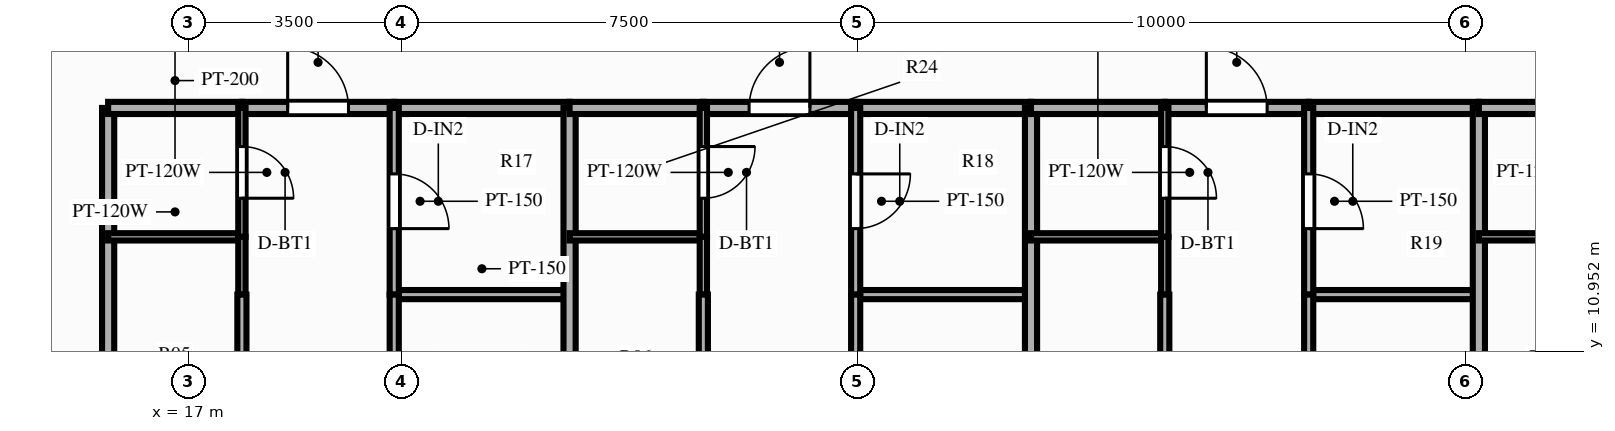
"""IFC4 building model, lengths in metres.
Left out: names, types, materials, properties, quantities, classifications, styles, units other than length and angle.
Written with IfcOpenShell. Run it as: python <this file> out.ifc"""

import sys

from ifc_helpers import new_model, si_unit, direction, frame, frame_2d, origin, place, context, subcontext, project, spatial, rectangle, extrude, source, transform, mapped, element, fill, save


model = new_model("IFC4")
c1 = context("Model", 3, precision=1e-05, world=origin(), true_north=direction((0.0, 1.0)))
c2 = subcontext(c1, "Body", "Model", "MODEL_VIEW")
j1 = project(units=[si_unit("LENGTHUNIT", "METRE"), si_unit("PLANEANGLEUNIT", "RADIAN")], contexts=[c1])
p1 = place(None, origin())
s1 = spatial("IfcSite", under=j1, at=p1, CompositionType="ELEMENT")
p2 = place(p1, origin())
s2 = spatial("IfcBuilding", under=s1, at=p2, CompositionType="ELEMENT")
p3 = place(p2, frame((0.0, 0.0, 25.4)))
s3 = spatial("IfcBuildingStorey", under=s2, at=p3, CompositionType="ELEMENT", Elevation=25.4)
p4 = place(p3, frame((15.68, 14.95, 0.0), z_axis=(0.0, 0.0, 1.0), x_axis=(0.0, -1.0, 0.0)))
e1 = element("IfcWall", 1, at=p4, inside=s3, PredefinedType="PARTITIONING", context=c2, shape_type="SweptSolid", body=[
    extrude(rectangle(XDim=11.8, YDim=0.2, at=frame_2d((5.9, 0.0))), origin(), (0.0, 0.0, 1.0), 2.79),
])
p5 = place(p3, frame((15.68, 14.95, 0.0), z_axis=(0.0, 0.0, 1.0), x_axis=(1.0, 0.0, 0.0)))
e2 = element("IfcWall", 2, at=p5, inside=s3, PredefinedType="PARTITIONING", context=c2, shape_type="SweptSolid", body=[
    extrude(rectangle(XDim=2.2, YDim=0.2, at=frame_2d((1.1, 0.0))), origin(), (0.0, 0.0, 1.0), 2.79),
])
p6 = place(p3, frame((17.88, 14.95, 0.0), z_axis=(0.0, 0.0, 1.0), x_axis=(1.0, 0.0, 0.0)))
e3 = element("IfcWall", 3, at=p6, inside=s3, PredefinedType="PARTITIONING", context=c2, shape_type="SweptSolid", body=[
    extrude(rectangle(XDim=2.505, YDim=0.2, at=frame_2d((1.252, 0.0))), origin(), (0.0, 0.0, 1.0), 2.79),
])
p7 = place(p6, frame((0.753, 0.0, 0.0)))
e4 = element("IfcOpeningElement", 4, at=p7, cuts=e3, PredefinedType="OPENING", context=c2, shape_type="SweptSolid", body=[
    extrude(rectangle(XDim=1.0, YDim=2.15, at=frame_2d((0.5, 1.075))), frame((0.0, 0.112, 0.0), z_axis=(0.0, -1.0, 0.0), x_axis=(1.0, 0.0, 0.0)), (0.0, 0.0, 1.0), 0.224),
])
p8 = place(p3, frame((20.385, 14.95, 0.0), z_axis=(0.0, 0.0, 1.0), x_axis=(1.0, 0.0, 0.0)))
e5 = element("IfcWall", 5, at=p8, inside=s3, PredefinedType="PARTITIONING", context=c2, shape_type="SweptSolid", body=[
    extrude(rectangle(XDim=2.884, YDim=0.2, at=frame_2d((1.442, 0.0))), origin(), (0.0, 0.0, 1.0), 2.79),
])
p9 = place(p3, frame((15.68, 12.83, 0.0), z_axis=(0.0, 0.0, 1.0), x_axis=(1.0, 0.0, 0.0)))
e6 = element("IfcWall", 6, at=p9, inside=s3, PredefinedType="PARTITIONING", context=c2, shape_type="SweptSolid", body=[
    extrude(rectangle(XDim=2.2, YDim=0.12, at=frame_2d((1.1, 0.0))), origin(), (0.0, 0.0, 1.0), 2.79),
])
p10 = place(p3, frame((20.385, 11.88, 0.0), z_axis=(0.0, 0.0, 1.0), x_axis=(1.0, 0.0, 0.0)))
e7 = element("IfcWall", 7, at=p10, inside=s3, PredefinedType="PARTITIONING", context=c2, shape_type="SweptSolid", body=[
    extrude(rectangle(XDim=2.884, YDim=0.15, at=frame_2d((1.442, 0.0))), origin(), (0.0, 0.0, 1.0), 2.79),
])
p11 = place(p3, frame((17.88, 14.95, 0.0), z_axis=(0.0, 0.0, 1.0), x_axis=(0.0, -1.0, 0.0)))
e8 = element("IfcWall", 8, at=p11, inside=s3, PredefinedType="PARTITIONING", context=c2, shape_type="SweptSolid", body=[
    extrude(rectangle(XDim=2.12, YDim=0.12, at=frame_2d((1.06, 0.0))), origin(), (0.0, 0.0, 1.0), 2.79),
])
p12 = place(p11, frame((0.635, 0.0, 0.0)))
e9 = element("IfcOpeningElement", 9, at=p12, cuts=e8, PredefinedType="OPENING", context=c2, shape_type="SweptSolid", body=[
    extrude(rectangle(XDim=0.85, YDim=2.05, at=frame_2d((0.425, 1.025))), frame((0.0, 0.072, 0.0), z_axis=(0.0, -1.0, 0.0), x_axis=(1.0, 0.0, 0.0)), (0.0, 0.0, 1.0), 0.144),
])
p13 = place(p3, frame((17.88, 12.83, 0.0), z_axis=(0.0, 0.0, 1.0), x_axis=(0.0, -1.0, 0.0)))
e10 = element("IfcWall", 10, at=p13, inside=s3, PredefinedType="PARTITIONING", context=c2, shape_type="SweptSolid", body=[
    extrude(rectangle(XDim=0.95, YDim=0.12, at=frame_2d((0.475, 0.0))), origin(), (0.0, 0.0, 1.0), 2.79),
])
p14 = place(p3, frame((17.88, 11.88, 0.0), z_axis=(0.0, 0.0, 1.0), x_axis=(0.0, -1.0, 0.0)))
e11 = element("IfcWall", 11, at=p14, inside=s3, PredefinedType="PARTITIONING", context=c2, shape_type="SweptSolid", body=[
    extrude(rectangle(XDim=8.73, YDim=0.15, at=frame_2d((4.365, 0.0))), origin(), (0.0, 0.0, 1.0), 2.79),
])
p15 = place(p14, frame((3.609, 0.0, 0.0)))
e12 = element("IfcOpeningElement", 12, at=p15, cuts=e11, PredefinedType="OPENING", context=c2, shape_type="SweptSolid", body=[
    extrude(rectangle(XDim=0.9, YDim=2.1, at=frame_2d((0.45, 1.05))), frame((0.0, 0.087, 0.0), z_axis=(0.0, -1.0, 0.0), x_axis=(1.0, 0.0, 0.0)), (0.0, 0.0, 1.0), 0.174),
])
p16 = place(p3, frame((20.385, 14.95, 0.0), z_axis=(0.0, 0.0, 1.0), x_axis=(0.0, -1.0, 0.0)))
e13 = element("IfcWall", 13, at=p16, inside=s3, PredefinedType="PARTITIONING", context=c2, shape_type="SweptSolid", body=[
    extrude(rectangle(XDim=3.07, YDim=0.15, at=frame_2d((1.535, 0.0))), origin(), (0.0, 0.0, 1.0), 2.79),
])
p17 = place(p16, frame((1.085, 0.0, 0.0)))
e14 = element("IfcOpeningElement", 14, at=p17, cuts=e13, PredefinedType="OPENING", context=c2, shape_type="SweptSolid", body=[
    extrude(rectangle(XDim=0.9, YDim=2.1, at=frame_2d((0.45, 1.05))), frame((0.0, 0.087, 0.0), z_axis=(0.0, -1.0, 0.0), x_axis=(1.0, 0.0, 0.0)), (0.0, 0.0, 1.0), 0.174),
])
p18 = place(p3, frame((20.385, 11.88, 0.0), z_axis=(0.0, 0.0, 1.0), x_axis=(0.0, -1.0, 0.0)))
e15 = element("IfcWall", 15, at=p18, inside=s3, PredefinedType="PARTITIONING", context=c2, shape_type="SweptSolid", body=[
    extrude(rectangle(XDim=8.73, YDim=0.15, at=frame_2d((4.365, 0.0))), origin(), (0.0, 0.0, 1.0), 2.79),
])
p19 = place(p18, frame((3.609, 0.0, 0.0)))
e16 = element("IfcOpeningElement", 16, at=p19, cuts=e15, PredefinedType="OPENING", context=c2, shape_type="SweptSolid", body=[
    extrude(rectangle(XDim=0.9, YDim=2.1, at=frame_2d((0.45, 1.05))), frame((0.0, 0.087, 0.0), z_axis=(0.0, -1.0, 0.0), x_axis=(1.0, 0.0, 0.0)), (0.0, 0.0, 1.0), 0.174),
])
p20 = place(p3, frame((23.269, 14.95, 0.0), z_axis=(0.0, 0.0, 1.0), x_axis=(0.0, -1.0, 0.0)))
e17 = element("IfcWall", 17, at=p20, inside=s3, PredefinedType="PARTITIONING", context=c2, shape_type="SweptSolid", body=[
    extrude(rectangle(XDim=11.8, YDim=0.2, at=frame_2d((5.9, 0.0))), origin(), (0.0, 0.0, 1.0), 2.79),
])
p21 = place(p3, frame((23.269, 14.95, 0.0), z_axis=(0.0, 0.0, 1.0), x_axis=(1.0, 0.0, 0.0)))
e18 = element("IfcWall", 18, at=p21, inside=s3, PredefinedType="PARTITIONING", context=c2, shape_type="SweptSolid", body=[
    extrude(rectangle(XDim=2.2, YDim=0.2, at=frame_2d((1.1, 0.0))), origin(), (0.0, 0.0, 1.0), 2.79),
])
p22 = place(p3, frame((25.469, 14.95, 0.0), z_axis=(0.0, 0.0, 1.0), x_axis=(1.0, 0.0, 0.0)))
e19 = element("IfcWall", 19, at=p22, inside=s3, PredefinedType="PARTITIONING", context=c2, shape_type="SweptSolid", body=[
    extrude(rectangle(XDim=2.505, YDim=0.2, at=frame_2d((1.252, 0.0))), origin(), (0.0, 0.0, 1.0), 2.79),
])
p23 = place(p22, frame((0.752, 0.0, 0.0)))
e20 = element("IfcOpeningElement", 20, at=p23, cuts=e19, PredefinedType="OPENING", context=c2, shape_type="SweptSolid", body=[
    extrude(rectangle(XDim=1.0, YDim=2.15, at=frame_2d((0.5, 1.075))), frame((0.0, 0.112, 0.0), z_axis=(0.0, -1.0, 0.0), x_axis=(1.0, 0.0, 0.0)), (0.0, 0.0, 1.0), 0.224),
])
p24 = place(p3, frame((27.974, 14.95, 0.0), z_axis=(0.0, 0.0, 1.0), x_axis=(1.0, 0.0, 0.0)))
e21 = element("IfcWall", 21, at=p24, inside=s3, PredefinedType="PARTITIONING", context=c2, shape_type="SweptSolid", body=[
    extrude(rectangle(XDim=2.884, YDim=0.2, at=frame_2d((1.442, 0.0))), origin(), (0.0, 0.0, 1.0), 2.79),
])
p25 = place(p3, frame((23.269, 12.83, 0.0), z_axis=(0.0, 0.0, 1.0), x_axis=(1.0, 0.0, 0.0)))
e22 = element("IfcWall", 22, at=p25, inside=s3, PredefinedType="PARTITIONING", context=c2, shape_type="SweptSolid", body=[
    extrude(rectangle(XDim=2.2, YDim=0.12, at=frame_2d((1.1, 0.0))), origin(), (0.0, 0.0, 1.0), 2.79),
])
p26 = place(p3, frame((27.974, 11.88, 0.0), z_axis=(0.0, 0.0, 1.0), x_axis=(1.0, 0.0, 0.0)))
e23 = element("IfcWall", 23, at=p26, inside=s3, PredefinedType="PARTITIONING", context=c2, shape_type="SweptSolid", body=[
    extrude(rectangle(XDim=2.884, YDim=0.15, at=frame_2d((1.442, 0.0))), origin(), (0.0, 0.0, 1.0), 2.79),
])
p27 = place(p3, frame((25.469, 14.95, 0.0), z_axis=(0.0, 0.0, 1.0), x_axis=(0.0, -1.0, 0.0)))
e24 = element("IfcWall", 24, at=p27, inside=s3, PredefinedType="PARTITIONING", context=c2, shape_type="SweptSolid", body=[
    extrude(rectangle(XDim=2.12, YDim=0.12, at=frame_2d((1.06, 0.0))), origin(), (0.0, 0.0, 1.0), 2.79),
])
p28 = place(p27, frame((0.635, 0.0, 0.0)))
e25 = element("IfcOpeningElement", 25, at=p28, cuts=e24, PredefinedType="OPENING", context=c2, shape_type="SweptSolid", body=[
    extrude(rectangle(XDim=0.85, YDim=2.05, at=frame_2d((0.425, 1.025))), frame((0.0, 0.072, 0.0), z_axis=(0.0, -1.0, 0.0), x_axis=(1.0, 0.0, 0.0)), (0.0, 0.0, 1.0), 0.144),
])
p29 = place(p3, frame((25.469, 12.83, 0.0), z_axis=(0.0, 0.0, 1.0), x_axis=(0.0, -1.0, 0.0)))
e26 = element("IfcWall", 26, at=p29, inside=s3, PredefinedType="PARTITIONING", context=c2, shape_type="SweptSolid", body=[
    extrude(rectangle(XDim=0.95, YDim=0.12, at=frame_2d((0.475, 0.0))), origin(), (0.0, 0.0, 1.0), 2.79),
])
p30 = place(p3, frame((25.469, 11.88, 0.0), z_axis=(0.0, 0.0, 1.0), x_axis=(0.0, -1.0, 0.0)))
e27 = element("IfcWall", 27, at=p30, inside=s3, PredefinedType="PARTITIONING", context=c2, shape_type="SweptSolid", body=[
    extrude(rectangle(XDim=8.73, YDim=0.15, at=frame_2d((4.365, 0.0))), origin(), (0.0, 0.0, 1.0), 2.79),
])
p31 = place(p30, frame((3.609, 0.0, 0.0)))
e28 = element("IfcOpeningElement", 28, at=p31, cuts=e27, PredefinedType="OPENING", context=c2, shape_type="SweptSolid", body=[
    extrude(rectangle(XDim=0.9, YDim=2.1, at=frame_2d((0.45, 1.05))), frame((0.0, 0.087, 0.0), z_axis=(0.0, -1.0, 0.0), x_axis=(1.0, 0.0, 0.0)), (0.0, 0.0, 1.0), 0.174),
])
p32 = place(p3, frame((27.974, 14.95, 0.0), z_axis=(0.0, 0.0, 1.0), x_axis=(0.0, -1.0, 0.0)))
e29 = element("IfcWall", 29, at=p32, inside=s3, PredefinedType="PARTITIONING", context=c2, shape_type="SweptSolid", body=[
    extrude(rectangle(XDim=3.07, YDim=0.15, at=frame_2d((1.535, 0.0))), origin(), (0.0, 0.0, 1.0), 2.79),
])
p33 = place(p32, frame((1.085, 0.0, 0.0)))
e30 = element("IfcOpeningElement", 30, at=p33, cuts=e29, PredefinedType="OPENING", context=c2, shape_type="SweptSolid", body=[
    extrude(rectangle(XDim=0.9, YDim=2.1, at=frame_2d((0.45, 1.05))), frame((0.0, 0.087, 0.0), z_axis=(0.0, -1.0, 0.0), x_axis=(1.0, 0.0, 0.0)), (0.0, 0.0, 1.0), 0.174),
])
p34 = place(p3, frame((27.974, 11.88, 0.0), z_axis=(0.0, 0.0, 1.0), x_axis=(0.0, -1.0, 0.0)))
e31 = element("IfcWall", 31, at=p34, inside=s3, PredefinedType="PARTITIONING", context=c2, shape_type="SweptSolid", body=[
    extrude(rectangle(XDim=8.73, YDim=0.15, at=frame_2d((4.365, 0.0))), origin(), (0.0, 0.0, 1.0), 2.79),
])
p35 = place(p34, frame((3.609, 0.0, 0.0)))
e32 = element("IfcOpeningElement", 32, at=p35, cuts=e31, PredefinedType="OPENING", context=c2, shape_type="SweptSolid", body=[
    extrude(rectangle(XDim=0.9, YDim=2.1, at=frame_2d((0.45, 1.05))), frame((0.0, 0.087, 0.0), z_axis=(0.0, -1.0, 0.0), x_axis=(1.0, 0.0, 0.0)), (0.0, 0.0, 1.0), 0.174),
])
p36 = place(p3, frame((30.858, 14.95, 0.0), z_axis=(0.0, 0.0, 1.0), x_axis=(0.0, -1.0, 0.0)))
e33 = element("IfcWall", 33, at=p36, inside=s3, PredefinedType="PARTITIONING", context=c2, shape_type="SweptSolid", body=[
    extrude(rectangle(XDim=11.8, YDim=0.2, at=frame_2d((5.9, 0.0))), origin(), (0.0, 0.0, 1.0), 2.24),
])
p37 = place(p3, frame((30.858, 14.95, 0.0), z_axis=(0.0, 0.0, 1.0), x_axis=(1.0, 0.0, 0.0)))
e34 = element("IfcWall", 34, at=p37, inside=s3, PredefinedType="PARTITIONING", context=c2, shape_type="SweptSolid", body=[
    extrude(rectangle(XDim=2.2, YDim=0.2, at=frame_2d((1.1, 0.0))), origin(), (0.0, 0.0, 1.0), 2.79),
])
p38 = place(p3, frame((33.058, 14.95, 0.0), z_axis=(0.0, 0.0, 1.0), x_axis=(1.0, 0.0, 0.0)))
e35 = element("IfcWall", 35, at=p38, inside=s3, PredefinedType="PARTITIONING", context=c2, shape_type="SweptSolid", body=[
    extrude(rectangle(XDim=2.367, YDim=0.2, at=frame_2d((1.183, 0.0))), origin(), (0.0, 0.0, 1.0), 2.79),
])
p39 = place(p38, frame((0.683, 0.0, 0.0)))
e36 = element("IfcOpeningElement", 36, at=p39, cuts=e35, PredefinedType="OPENING", context=c2, shape_type="SweptSolid", body=[
    extrude(rectangle(XDim=1.0, YDim=2.15, at=frame_2d((0.5, 1.075))), frame((0.0, 0.112, 0.0), z_axis=(0.0, -1.0, 0.0), x_axis=(1.0, 0.0, 0.0)), (0.0, 0.0, 1.0), 0.224),
])
p40 = place(p3, frame((35.424, 14.95, 0.0), z_axis=(0.0, 0.0, 1.0), x_axis=(1.0, 0.0, 0.0)))
e37 = element("IfcWall", 37, at=p40, inside=s3, PredefinedType="PARTITIONING", context=c2, shape_type="SweptSolid", body=[
    extrude(rectangle(XDim=2.799, YDim=0.2, at=frame_2d((1.399, 0.0))), origin(), (0.0, 0.0, 1.0), 2.79),
])
p41 = place(p3, frame((30.858, 12.83, 0.0), z_axis=(0.0, 0.0, 1.0), x_axis=(1.0, 0.0, 0.0)))
e38 = element("IfcWall", 38, at=p41, inside=s3, PredefinedType="PARTITIONING", context=c2, shape_type="SweptSolid", body=[
    extrude(rectangle(XDim=2.2, YDim=0.12, at=frame_2d((1.1, 0.0))), origin(), (0.0, 0.0, 1.0), 2.79),
])
p42 = place(p3, frame((35.424, 11.88, 0.0), z_axis=(0.0, 0.0, 1.0), x_axis=(1.0, 0.0, 0.0)))
e39 = element("IfcWall", 39, at=p42, inside=s3, PredefinedType="PARTITIONING", context=c2, shape_type="SweptSolid", body=[
    extrude(rectangle(XDim=2.799, YDim=0.15, at=frame_2d((1.399, 0.0))), origin(), (0.0, 0.0, 1.0), 2.79),
])
p43 = place(p3, frame((33.058, 14.95, 0.0), z_axis=(0.0, 0.0, 1.0), x_axis=(0.0, -1.0, 0.0)))
e40 = element("IfcWall", 40, at=p43, inside=s3, PredefinedType="PARTITIONING", context=c2, shape_type="SweptSolid", body=[
    extrude(rectangle(XDim=2.12, YDim=0.12, at=frame_2d((1.06, 0.0))), origin(), (0.0, 0.0, 1.0), 2.79),
])
p44 = place(p43, frame((0.635, 0.0, 0.0)))
e41 = element("IfcOpeningElement", 41, at=p44, cuts=e40, PredefinedType="OPENING", context=c2, shape_type="SweptSolid", body=[
    extrude(rectangle(XDim=0.85, YDim=2.05, at=frame_2d((0.425, 1.025))), frame((0.0, 0.072, 0.0), z_axis=(0.0, -1.0, 0.0), x_axis=(1.0, 0.0, 0.0)), (0.0, 0.0, 1.0), 0.144),
])
p45 = place(p3, frame((33.058, 12.83, 0.0), z_axis=(0.0, 0.0, 1.0), x_axis=(0.0, -1.0, 0.0)))
e42 = element("IfcWall", 42, at=p45, inside=s3, PredefinedType="PARTITIONING", context=c2, shape_type="SweptSolid", body=[
    extrude(rectangle(XDim=0.95, YDim=0.12, at=frame_2d((0.475, 0.0))), origin(), (0.0, 0.0, 1.0), 2.79),
])
p46 = place(p3, frame((33.058, 11.88, 0.0), z_axis=(0.0, 0.0, 1.0), x_axis=(0.0, -1.0, 0.0)))
e43 = element("IfcWall", 43, at=p46, inside=s3, PredefinedType="PARTITIONING", context=c2, shape_type="SweptSolid", body=[
    extrude(rectangle(XDim=8.73, YDim=0.15, at=frame_2d((4.365, 0.0))), origin(), (0.0, 0.0, 1.0), 2.79),
])
p47 = place(p46, frame((3.609, 0.0, 0.0)))
e44 = element("IfcOpeningElement", 44, at=p47, cuts=e43, PredefinedType="OPENING", context=c2, shape_type="SweptSolid", body=[
    extrude(rectangle(XDim=0.9, YDim=2.1, at=frame_2d((0.45, 1.05))), frame((0.0, 0.087, 0.0), z_axis=(0.0, -1.0, 0.0), x_axis=(1.0, 0.0, 0.0)), (0.0, 0.0, 1.0), 0.174),
])
p48 = place(p3, frame((35.424, 14.95, 0.0), z_axis=(0.0, 0.0, 1.0), x_axis=(0.0, -1.0, 0.0)))
e45 = element("IfcWall", 45, at=p48, inside=s3, PredefinedType="PARTITIONING", context=c2, shape_type="SweptSolid", body=[
    extrude(rectangle(XDim=3.07, YDim=0.15, at=frame_2d((1.535, 0.0))), origin(), (0.0, 0.0, 1.0), 2.79),
])
p49 = place(p48, frame((1.085, 0.0, 0.0)))
e46 = element("IfcOpeningElement", 46, at=p49, cuts=e45, PredefinedType="OPENING", context=c2, shape_type="SweptSolid", body=[
    extrude(rectangle(XDim=0.9, YDim=2.1, at=frame_2d((0.45, 1.05))), frame((0.0, 0.087, 0.0), z_axis=(0.0, -1.0, 0.0), x_axis=(1.0, 0.0, 0.0)), (0.0, 0.0, 1.0), 0.174),
])
p50 = place(p3, frame((35.424, 11.88, 0.0), z_axis=(0.0, 0.0, 1.0), x_axis=(0.0, -1.0, 0.0)))
e47 = element("IfcWall", 47, at=p50, inside=s3, PredefinedType="PARTITIONING", context=c2, shape_type="SweptSolid", body=[
    extrude(rectangle(XDim=8.73, YDim=0.15, at=frame_2d((4.365, 0.0))), origin(), (0.0, 0.0, 1.0), 2.79),
])
p51 = place(p50, frame((3.609, 0.0, 0.0)))
e48 = element("IfcOpeningElement", 48, at=p51, cuts=e47, PredefinedType="OPENING", context=c2, shape_type="SweptSolid", body=[
    extrude(rectangle(XDim=0.9, YDim=2.1, at=frame_2d((0.45, 1.05))), frame((0.0, 0.087, 0.0), z_axis=(0.0, -1.0, 0.0), x_axis=(1.0, 0.0, 0.0)), (0.0, 0.0, 1.0), 0.174),
])
p52 = place(p3, frame((38.223, 14.95, 0.0), z_axis=(0.0, 0.0, 1.0), x_axis=(0.0, -1.0, 0.0)))
e49 = element("IfcWall", 49, at=p52, inside=s3, PredefinedType="PARTITIONING", context=c2, shape_type="SweptSolid", body=[
    extrude(rectangle(XDim=11.8, YDim=0.2, at=frame_2d((5.9, 0.0))), origin(), (0.0, 0.0, 1.0), 2.79),
])
p53 = place(p3, frame((38.223, 14.95, 0.0), z_axis=(0.0, 0.0, 1.0), x_axis=(1.0, 0.0, 0.0)))
e50 = element("IfcWall", 50, at=p53, inside=s3, PredefinedType="PARTITIONING", context=c2, shape_type="SweptSolid", body=[
    extrude(rectangle(XDim=2.2, YDim=0.2, at=frame_2d((1.1, 0.0))), origin(), (0.0, 0.0, 1.0), 2.79),
])
p54 = place(p3, frame((38.223, 12.83, 0.0), z_axis=(0.0, 0.0, 1.0), x_axis=(1.0, 0.0, 0.0)))
e51 = element("IfcWall", 51, at=p54, inside=s3, PredefinedType="PARTITIONING", context=c2, shape_type="SweptSolid", body=[
    extrude(rectangle(XDim=2.2, YDim=0.12, at=frame_2d((1.1, 0.0))), origin(), (0.0, 0.0, 1.0), 2.79),
])
m1 = source(origin(), c2, "Body", "SweptSolid", [
    extrude(rectangle(XDim=1.0, YDim=2.15, at=frame_2d((0.5, 1.075))), frame((0.0, 0.025, 0.0), z_axis=(0.0, -1.0, 0.0), x_axis=(1.0, 0.0, 0.0)), (0.0, 0.0, 1.0), 0.05),
])
p55 = place(p7, origin())
e52 = element("IfcDoor", 52, at=p55, inside=s3, OperationType="SINGLE_SWING_LEFT", PredefinedType="DOOR", context=c2, shape_type="MappedRepresentation", body=[
    mapped(m1, transform((0.0, 0.0, 0.0), scale=1.0)),
])
fill(e4, e52)
m2 = source(origin(), c2, "Body", "SweptSolid", [
    extrude(rectangle(XDim=0.85, YDim=2.05, at=frame_2d((0.425, 1.025))), frame((0.0, 0.025, 0.0), z_axis=(0.0, -1.0, 0.0), x_axis=(1.0, 0.0, 0.0)), (0.0, 0.0, 1.0), 0.05),
])
p56 = place(p12, origin())
e53 = element("IfcDoor", 53, at=p56, inside=s3, OperationType="SINGLE_SWING_RIGHT", PredefinedType="DOOR", context=c2, shape_type="MappedRepresentation", body=[
    mapped(m2, transform((0.0, 0.0, 0.0), scale=1.0)),
])
fill(e9, e53)
m3 = source(origin(), c2, "Body", "SweptSolid", [
    extrude(rectangle(XDim=0.9, YDim=2.1, at=frame_2d((0.45, 1.05))), frame((0.0, 0.025, 0.0), z_axis=(0.0, -1.0, 0.0), x_axis=(1.0, 0.0, 0.0)), (0.0, 0.0, 1.0), 0.05),
])
p57 = place(p17, origin())
e54 = element("IfcDoor", 54, at=p57, inside=s3, OperationType="SINGLE_SWING_RIGHT", PredefinedType="DOOR", context=c2, shape_type="MappedRepresentation", body=[
    mapped(m3, transform((0.0, 0.0, 0.0), scale=1.0)),
])
fill(e14, e54)
p58 = place(p23, origin())
e55 = element("IfcDoor", 55, at=p58, inside=s3, OperationType="SINGLE_SWING_RIGHT", PredefinedType="DOOR", context=c2, shape_type="MappedRepresentation", body=[
    mapped(m1, transform((0.0, 0.0, 0.0), scale=1.0)),
])
fill(e20, e55)
p59 = place(p28, origin())
e56 = element("IfcDoor", 56, at=p59, inside=s3, OperationType="SINGLE_SWING_LEFT", PredefinedType="DOOR", context=c2, shape_type="MappedRepresentation", body=[
    mapped(m2, transform((0.0, 0.0, 0.0), scale=1.0)),
])
fill(e25, e56)
p60 = place(p33, origin())
e57 = element("IfcDoor", 57, at=p60, inside=s3, OperationType="SINGLE_SWING_LEFT", PredefinedType="DOOR", context=c2, shape_type="MappedRepresentation", body=[
    mapped(m3, transform((0.0, 0.0, 0.0), scale=1.0)),
])
fill(e30, e57)
p61 = place(p39, origin())
e58 = element("IfcDoor", 58, at=p61, inside=s3, OperationType="SINGLE_SWING_LEFT", PredefinedType="DOOR", context=c2, shape_type="MappedRepresentation", body=[
    mapped(m1, transform((0.0, 0.0, 0.0), scale=1.0)),
])
fill(e36, e58)
p62 = place(p44, origin())
e59 = element("IfcDoor", 59, at=p62, inside=s3, OperationType="SINGLE_SWING_RIGHT", PredefinedType="DOOR", context=c2, shape_type="MappedRepresentation", body=[
    mapped(m2, transform((0.0, 0.0, 0.0), scale=1.0)),
])
fill(e41, e59)
p63 = place(p49, origin())
e60 = element("IfcDoor", 60, at=p63, inside=s3, OperationType="SINGLE_SWING_RIGHT", PredefinedType="DOOR", context=c2, shape_type="MappedRepresentation", body=[
    mapped(m3, transform((0.0, 0.0, 0.0), scale=1.0)),
])
fill(e46, e60)
save(model, sys.argv[1])
